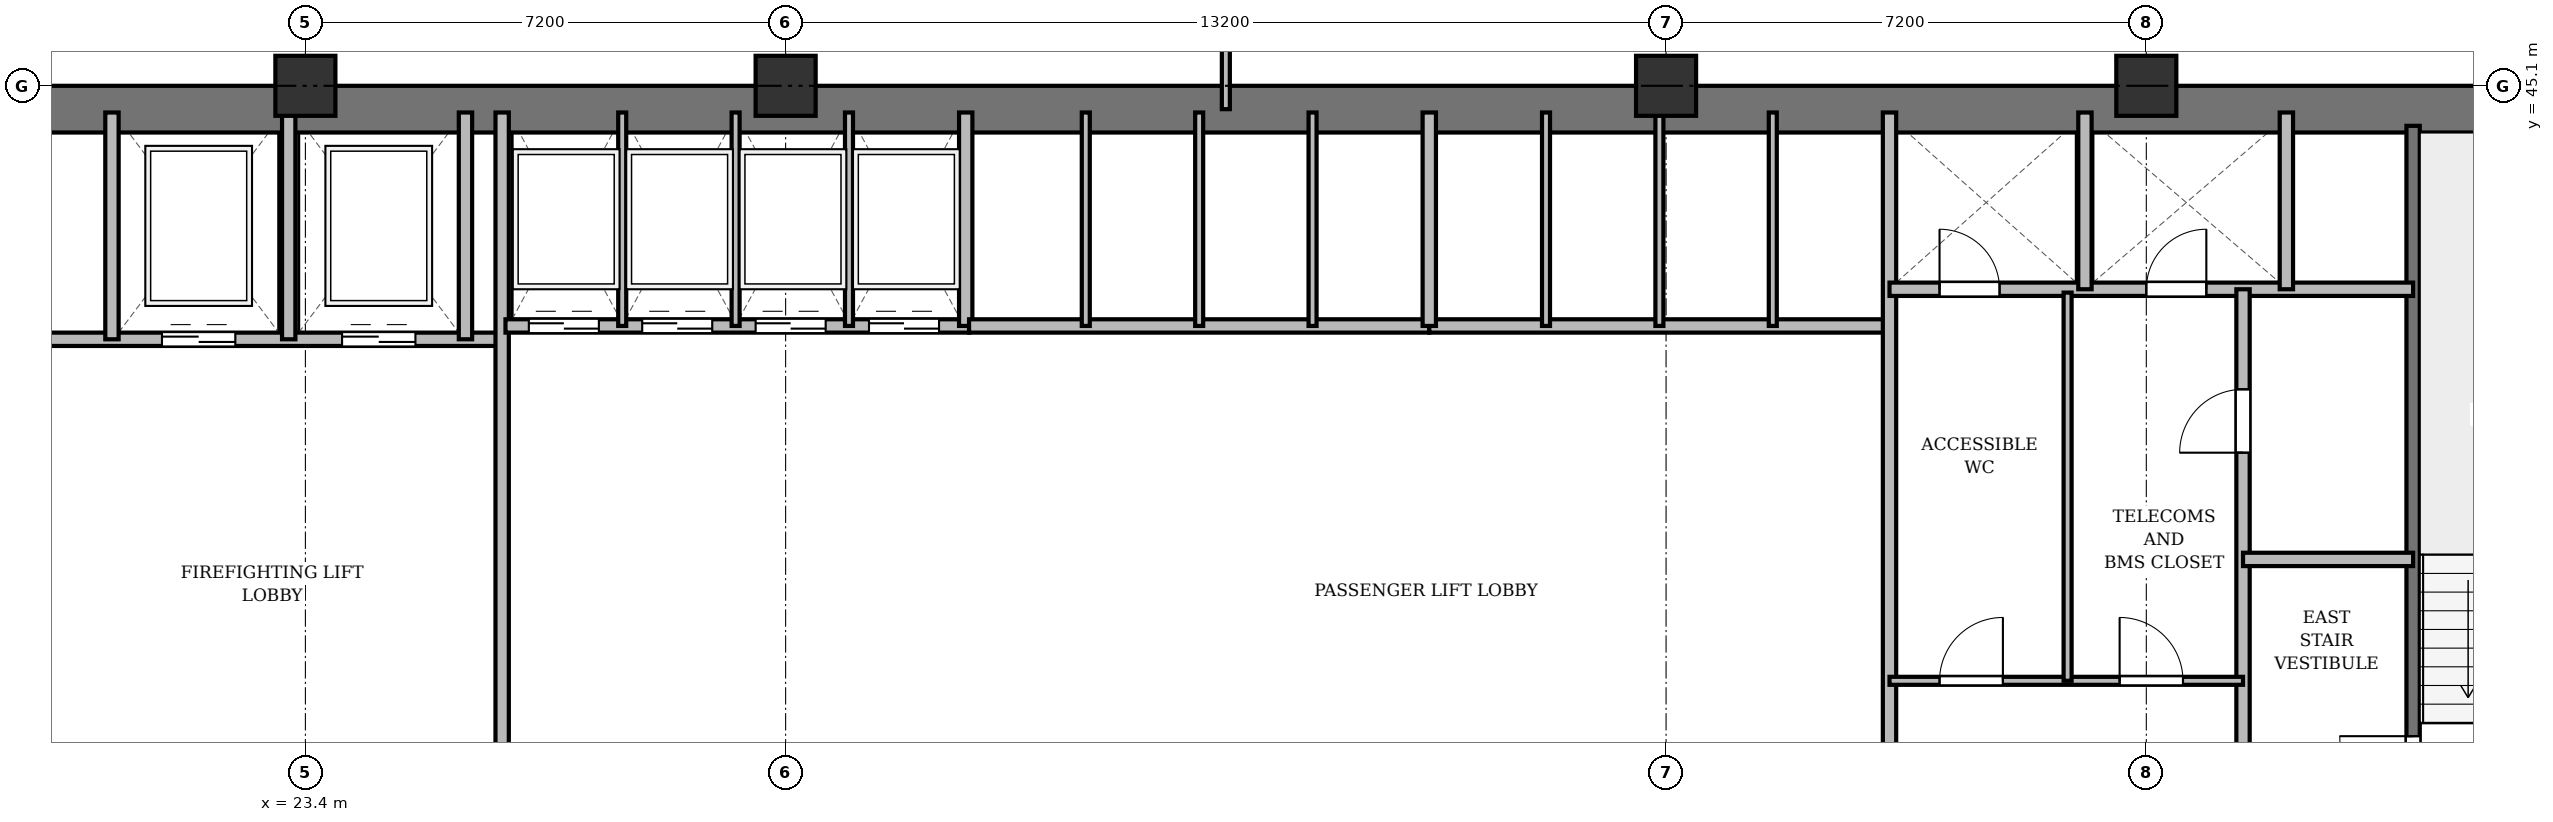
"""IFC4 building model, lengths in metres.
Left out: names, types, materials, properties, quantities, classifications, styles, units other than length and angle.
Written with IfcOpenShell. Run it as: python <this file> out.ifc"""

import sys

from ifc_helpers import new_model, si_unit, direction, frame, frame_2d, origin, origin_2d, place, context, subcontext, project, spatial, rectangle, extrude, source, transform, mapped, element, fill, save


model = new_model("IFC4")
c1 = context("Model", 3, precision=1e-05, world=origin(), true_north=direction((0.0, 1.0)))
c2 = subcontext(c1, "Body", "Model", "MODEL_VIEW")
j1 = project(units=[si_unit("LENGTHUNIT", "METRE"), si_unit("PLANEANGLEUNIT", "RADIAN")], contexts=[c1])
p1 = place(None, origin())
s1 = spatial("IfcSite", under=j1, at=p1, CompositionType="ELEMENT")
p2 = place(p1, origin())
s2 = spatial("IfcBuilding", under=s1, at=p2, CompositionType="ELEMENT")
p3 = place(p2, frame((0.0, 0.0, 45.1)))
s3 = spatial("IfcBuildingStorey", under=s2, at=p3, CompositionType="ELEMENT", Elevation=45.1)
m1 = source(origin(), c2, "Body", "SweptSolid", [
    extrude(rectangle(XDim=0.9, YDim=0.9, at=origin_2d()), origin(), (0.0, 0.0, 1.0), 3.6),
])
for number, where, z_axis, x_axis in (
    (1, (23.4, 45.1, 0.0), (0.0, 0.0, 1.0), (1.0, 0.0, 0.0)),
    (2, (30.6, 45.1, 0.0), (0.0, 0.0, 1.0), (1.0, 0.0, 0.0)),
    (3, (43.8, 45.1, 0.0), (0.0, 0.0, 1.0), (1.0, 0.0, 0.0)),
    (4, (51.0, 45.1, 0.0), (0.0, 0.0, 1.0), (1.0, 0.0, 0.0)),
):
    element("IfcColumn", number, at=place(p3, frame(where, z_axis=z_axis, x_axis=x_axis)), inside=s3, PredefinedType="COLUMN", context=c2, shape_type="MappedRepresentation", body=[
        mapped(m1, transform((0.0, 0.0, 0.0), x_axis=(1.0, 0.0, 0.0), y_axis=(0.0, 1.0, 0.0), z_axis=(0.0, 0.0, 1.0), scale=1.0)),
    ])
p4 = place(p3, frame((15.5, 44.75, 0.0), z_axis=(0.0, 0.0, 1.0), x_axis=(1.0, 0.0, 0.0)))
e5 = element("IfcWall", 5, at=p4, inside=s3, PredefinedType="SHEAR", context=c2, shape_type="SweptSolid", body=[
    extrude(rectangle(XDim=43.4, YDim=0.7, at=frame_2d((21.7, 0.0))), origin(), (0.0, 0.0, 1.0), 3.34),
])
p5 = place(p3, frame((55.0, 33.4, 0.0), z_axis=(0.0, 0.0, 1.0), x_axis=(0.0, 1.0, 0.0)))
e6 = element("IfcWall", 6, at=p5, inside=s3, PredefinedType="SHEAR", context=c2, shape_type="SweptSolid", body=[
    extrude(rectangle(XDim=11.1, YDim=0.2, at=frame_2d((5.55, 0.0))), origin(), (0.0, 0.0, 1.0), 3.34),
])
p6 = place(p5, frame((0.85, 0.0, 0.0)))
e7 = element("IfcOpeningElement", 7, at=p6, cuts=e6, PredefinedType="OPENING", context=c2, shape_type="SweptSolid", body=[
    extrude(rectangle(XDim=1.1, YDim=2.15, at=frame_2d((0.55, 1.075))), frame((0.0, 0.11, 0.0), z_axis=(0.0, -1.0, 0.0), x_axis=(1.0, 0.0, 0.0)), (0.0, 0.0, 1.0), 0.22),
])
p7 = place(p3, frame((19.55, 41.3, 0.0), z_axis=(0.0, 0.0, 1.0), x_axis=(1.0, 0.0, 0.0)))
e8 = element("IfcWall", 8, at=p7, inside=s3, PredefinedType="SOLIDWALL", context=c2, shape_type="SweptSolid", body=[
    extrude(rectangle(XDim=6.75, YDim=0.2, at=frame_2d((3.375, 0.0))), origin(), (0.0, 0.0, 1.0), 3.34),
])
p8 = place(p7, frame((1.7, 0.0, 0.0)))
e9 = element("IfcOpeningElement", 9, at=p8, cuts=e8, PredefinedType="OPENING", context=c2, shape_type="SweptSolid", body=[
    extrude(rectangle(XDim=1.1, YDim=2.15, at=frame_2d((0.55, 1.075))), frame((0.0, 0.11, 0.0), z_axis=(0.0, -1.0, 0.0), x_axis=(1.0, 0.0, 0.0)), (0.0, 0.0, 1.0), 0.22),
])
p9 = place(p7, frame((4.4, 0.0, 0.0)))
e10 = element("IfcOpeningElement", 10, at=p9, cuts=e8, PredefinedType="OPENING", context=c2, shape_type="SweptSolid", body=[
    extrude(rectangle(XDim=1.1, YDim=2.15, at=frame_2d((0.55, 1.075))), frame((0.0, 0.11, 0.0), z_axis=(0.0, -1.0, 0.0), x_axis=(1.0, 0.0, 0.0)), (0.0, 0.0, 1.0), 0.22),
])
for number, where, z_axis, x_axis in (
    (11, (20.5, 41.3, 0.0), (0.0, 0.0, 1.0), (0.0, 1.0, 0.0)),
    (12, (23.15, 41.3, 0.0), (0.0, 0.0, 1.0), (0.0, 1.0, 0.0)),
    (13, (25.8, 41.3, 0.0), (0.0, 0.0, 1.0), (0.0, 1.0, 0.0)),
):
    element("IfcWall", number, at=place(p3, frame(where, z_axis=z_axis, x_axis=x_axis)), inside=s3, PredefinedType="SOLIDWALL", context=c2, shape_type="SweptSolid", body=[
        extrude(rectangle(XDim=3.4, YDim=0.2, at=frame_2d((1.7, 0.0))), origin(), (0.0, 0.0, 1.0), 3.34),
    ])
p10 = place(p3, frame((26.35, 33.4, 0.0), z_axis=(0.0, 0.0, 1.0), x_axis=(0.0, 1.0, 0.0)))
e14 = element("IfcWall", 14, at=p10, inside=s3, PredefinedType="SOLIDWALL", context=c2, shape_type="SweptSolid", body=[
    extrude(rectangle(XDim=11.3, YDim=0.2, at=frame_2d((5.65, 0.0))), origin(), (0.0, 0.0, 1.0), 2.69),
])
p11 = place(p3, frame((26.4, 41.5, 0.0), z_axis=(0.0, 0.0, 1.0), x_axis=(1.0, 0.0, 0.0)))
e15 = element("IfcWall", 15, at=p11, inside=s3, PredefinedType="SOLIDWALL", context=c2, shape_type="SweptSolid", body=[
    extrude(rectangle(XDim=6.95, YDim=0.2, at=frame_2d((3.475, 0.0))), origin(), (0.0, 0.0, 1.0), 3.34),
])
p12 = place(p11, frame((0.35, 0.0, 0.0)))
e16 = element("IfcOpeningElement", 16, at=p12, cuts=e15, PredefinedType="OPENING", context=c2, shape_type="SweptSolid", body=[
    extrude(rectangle(XDim=1.05, YDim=2.15, at=frame_2d((0.525, 1.075))), frame((0.0, 0.11, 0.0), z_axis=(0.0, -1.0, 0.0), x_axis=(1.0, 0.0, 0.0)), (0.0, 0.0, 1.0), 0.22),
])
p13 = place(p11, frame((2.05, 0.0, 0.0)))
e17 = element("IfcOpeningElement", 17, at=p13, cuts=e15, PredefinedType="OPENING", context=c2, shape_type="SweptSolid", body=[
    extrude(rectangle(XDim=1.05, YDim=2.15, at=frame_2d((0.525, 1.075))), frame((0.0, 0.11, 0.0), z_axis=(0.0, -1.0, 0.0), x_axis=(1.0, 0.0, 0.0)), (0.0, 0.0, 1.0), 0.22),
])
p14 = place(p11, frame((3.75, 0.0, 0.0)))
e18 = element("IfcOpeningElement", 18, at=p14, cuts=e15, PredefinedType="OPENING", context=c2, shape_type="SweptSolid", body=[
    extrude(rectangle(XDim=1.05, YDim=2.15, at=frame_2d((0.525, 1.075))), frame((0.0, 0.11, 0.0), z_axis=(0.0, -1.0, 0.0), x_axis=(1.0, 0.0, 0.0)), (0.0, 0.0, 1.0), 0.22),
])
p15 = place(p11, frame((5.45, 0.0, 0.0)))
e19 = element("IfcOpeningElement", 19, at=p15, cuts=e15, PredefinedType="OPENING", context=c2, shape_type="SweptSolid", body=[
    extrude(rectangle(XDim=1.05, YDim=2.15, at=frame_2d((0.525, 1.075))), frame((0.0, 0.11, 0.0), z_axis=(0.0, -1.0, 0.0), x_axis=(1.0, 0.0, 0.0)), (0.0, 0.0, 1.0), 0.22),
])
p16 = place(p3, frame((33.3, 41.5, 0.0), z_axis=(0.0, 0.0, 1.0), x_axis=(0.0, 1.0, 0.0)))
e20 = element("IfcWall", 20, at=p16, inside=s3, PredefinedType="SOLIDWALL", context=c2, shape_type="SweptSolid", body=[
    extrude(rectangle(XDim=3.2, YDim=0.2, at=frame_2d((1.6, 0.0))), origin(), (0.0, 0.0, 1.0), 3.34),
])
for number, where, z_axis, x_axis in (
    (21, (28.15, 41.5, 0.0), (0.0, 0.0, 1.0), (0.0, 1.0, 0.0)),
    (22, (29.85, 41.5, 0.0), (0.0, 0.0, 1.0), (0.0, 1.0, 0.0)),
    (23, (31.55, 41.5, 0.0), (0.0, 0.0, 1.0), (0.0, 1.0, 0.0)),
):
    element("IfcWall", number, at=place(p3, frame(where, z_axis=z_axis, x_axis=x_axis)), inside=s3, PredefinedType="PARTITIONING", context=c2, shape_type="SweptSolid", body=[
        extrude(rectangle(XDim=3.2, YDim=0.12, at=frame_2d((1.6, 0.0))), origin(), (0.0, 0.0, 1.0), 3.34),
    ])
p17 = place(p3, frame((33.35, 41.5, 0.0), z_axis=(0.0, 0.0, 1.0), x_axis=(1.0, 0.0, 0.0)))
e24 = element("IfcWall", 24, at=p17, inside=s3, PredefinedType="SOLIDWALL", context=c2, shape_type="SweptSolid", body=[
    extrude(rectangle(XDim=6.9, YDim=0.2, at=frame_2d((3.45, 0.0))), origin(), (0.0, 0.0, 1.0), 3.34),
])
for number, where, z_axis, x_axis in (
    (25, (35.1, 41.5, 0.0), (0.0, 0.0, 1.0), (0.0, 1.0, 0.0)),
    (26, (36.8, 41.5, 0.0), (0.0, 0.0, 1.0), (0.0, 1.0, 0.0)),
    (27, (38.5, 41.5, 0.0), (0.0, 0.0, 1.0), (0.0, 1.0, 0.0)),
):
    element("IfcWall", number, at=place(p3, frame(where, z_axis=z_axis, x_axis=x_axis)), inside=s3, PredefinedType="PARTITIONING", context=c2, shape_type="SweptSolid", body=[
        extrude(rectangle(XDim=3.2, YDim=0.12, at=frame_2d((1.6, 0.0))), origin(), (0.0, 0.0, 1.0), 3.34),
    ])
p18 = place(p3, frame((40.25, 41.5, 0.0), z_axis=(0.0, 0.0, 1.0), x_axis=(1.0, 0.0, 0.0)))
e28 = element("IfcWall", 28, at=p18, inside=s3, PredefinedType="SOLIDWALL", context=c2, shape_type="SweptSolid", body=[
    extrude(rectangle(XDim=6.9, YDim=0.2, at=frame_2d((3.45, 0.0))), origin(), (0.0, 0.0, 1.0), 2.752),
])
p19 = place(p3, frame((40.25, 41.5, 0.0), z_axis=(0.0, 0.0, 1.0), x_axis=(0.0, 1.0, 0.0)))
e29 = element("IfcWall", 29, at=p19, inside=s3, PredefinedType="SOLIDWALL", context=c2, shape_type="SweptSolid", body=[
    extrude(rectangle(XDim=3.2, YDim=0.2, at=frame_2d((1.6, 0.0))), origin(), (0.0, 0.0, 1.0), 3.34),
])
p20 = place(p3, frame((42.0, 41.5, 0.0), z_axis=(0.0, 0.0, 1.0), x_axis=(0.0, 1.0, 0.0)))
e30 = element("IfcWall", 30, at=p20, inside=s3, PredefinedType="PARTITIONING", context=c2, shape_type="SweptSolid", body=[
    extrude(rectangle(XDim=3.2, YDim=0.12, at=frame_2d((1.6, 0.0))), origin(), (0.0, 0.0, 1.0), 3.34),
])
p21 = place(p3, frame((43.7, 41.5, 0.0), z_axis=(0.0, 0.0, 1.0), x_axis=(0.0, 1.0, 0.0)))
e31 = element("IfcWall", 31, at=p21, inside=s3, PredefinedType="PARTITIONING", context=c2, shape_type="SweptSolid", body=[
    extrude(rectangle(XDim=3.2, YDim=0.12, at=frame_2d((1.6, 0.0))), origin(), (0.0, 0.0, 1.0), 2.752),
])
p22 = place(p3, frame((45.4, 41.5, 0.0), z_axis=(0.0, 0.0, 1.0), x_axis=(0.0, 1.0, 0.0)))
e32 = element("IfcWall", 32, at=p22, inside=s3, PredefinedType="PARTITIONING", context=c2, shape_type="SweptSolid", body=[
    extrude(rectangle(XDim=3.2, YDim=0.12, at=frame_2d((1.6, 0.0))), origin(), (0.0, 0.0, 1.0), 3.34),
])
p23 = place(p3, frame((47.15, 33.4, 0.0), z_axis=(0.0, 0.0, 1.0), x_axis=(0.0, 1.0, 0.0)))
e33 = element("IfcWall", 33, at=p23, inside=s3, PredefinedType="SOLIDWALL", context=c2, shape_type="SweptSolid", body=[
    extrude(rectangle(XDim=11.3, YDim=0.2, at=frame_2d((5.65, 0.0))), origin(), (0.0, 0.0, 1.0), 2.69),
])
p24 = place(p3, frame((47.15, 42.05, 0.0), z_axis=(0.0, 0.0, 1.0), x_axis=(1.0, 0.0, 0.0)))
e34 = element("IfcWall", 34, at=p24, inside=s3, PredefinedType="SOLIDWALL", context=c2, shape_type="SweptSolid", body=[
    extrude(rectangle(XDim=7.85, YDim=0.2, at=frame_2d((3.925, 0.0))), origin(), (0.0, 0.0, 1.0), 2.752),
])
p25 = place(p24, frame((0.75, 0.0, 0.0)))
e35 = element("IfcOpeningElement", 35, at=p25, cuts=e34, PredefinedType="OPENING", context=c2, shape_type="SweptSolid", body=[
    extrude(rectangle(XDim=0.9, YDim=2.1, at=frame_2d((0.45, 1.05))), frame((0.0, 0.11, 0.0), z_axis=(0.0, -1.0, 0.0), x_axis=(1.0, 0.0, 0.0)), (0.0, 0.0, 1.0), 0.22),
])
p26 = place(p24, frame((3.85, 0.0, 0.0)))
e36 = element("IfcOpeningElement", 36, at=p26, cuts=e34, PredefinedType="OPENING", context=c2, shape_type="SweptSolid", body=[
    extrude(rectangle(XDim=0.9, YDim=2.1, at=frame_2d((0.45, 1.05))), frame((0.0, 0.11, 0.0), z_axis=(0.0, -1.0, 0.0), x_axis=(1.0, 0.0, 0.0)), (0.0, 0.0, 1.0), 0.22),
])
for number, where, z_axis, x_axis in (
    (37, (50.08, 42.05, 0.0), (0.0, 0.0, 1.0), (0.0, 1.0, 0.0)),
    (38, (53.1, 42.05, 0.0), (0.0, 0.0, 1.0), (0.0, 1.0, 0.0)),
):
    element("IfcWall", number, at=place(p3, frame(where, z_axis=z_axis, x_axis=x_axis)), inside=s3, PredefinedType="SOLIDWALL", context=c2, shape_type="SweptSolid", body=[
        extrude(rectangle(XDim=2.65, YDim=0.2, at=frame_2d((1.325, 0.0))), origin(), (0.0, 0.0, 1.0), 3.34),
    ])
p27 = place(p3, frame((52.45, 33.4, 0.0), z_axis=(0.0, 0.0, 1.0), x_axis=(0.0, 1.0, 0.0)))
e39 = element("IfcWall", 39, at=p27, inside=s3, PredefinedType="PARTITIONING", context=c2, shape_type="SweptSolid", body=[
    extrude(rectangle(XDim=8.65, YDim=0.2, at=frame_2d((4.325, 0.0))), origin(), (0.0, 0.0, 1.0), 2.69),
])
p28 = place(p27, frame((6.2, 0.0, 0.0)))
e40 = element("IfcOpeningElement", 40, at=p28, cuts=e39, PredefinedType="OPENING", context=c2, shape_type="SweptSolid", body=[
    extrude(rectangle(XDim=0.95, YDim=2.15, at=frame_2d((0.475, 1.075))), frame((0.0, 0.11, 0.0), z_axis=(0.0, -1.0, 0.0), x_axis=(1.0, 0.0, 0.0)), (0.0, 0.0, 1.0), 0.22),
])
p29 = place(p3, frame((52.45, 38.0, 0.0), z_axis=(0.0, 0.0, 1.0), x_axis=(1.0, 0.0, 0.0)))
e41 = element("IfcWall", 41, at=p29, inside=s3, PredefinedType="PARTITIONING", context=c2, shape_type="SweptSolid", body=[
    extrude(rectangle(XDim=2.55, YDim=0.2, at=frame_2d((1.275, 0.0))), origin(), (0.0, 0.0, 1.0), 3.34),
])
p30 = place(p3, frame((47.15, 36.18, 0.0), z_axis=(0.0, 0.0, 1.0), x_axis=(1.0, 0.0, 0.0)))
e42 = element("IfcWall", 42, at=p30, inside=s3, PredefinedType="PARTITIONING", context=c2, shape_type="SweptSolid", body=[
    extrude(rectangle(XDim=5.3, YDim=0.12, at=frame_2d((2.65, 0.0))), origin(), (0.0, 0.0, 1.0), 2.752),
])
p31 = place(p30, frame((0.75, 0.0, 0.0)))
e43 = element("IfcOpeningElement", 43, at=p31, cuts=e42, PredefinedType="OPENING", context=c2, shape_type="SweptSolid", body=[
    extrude(rectangle(XDim=0.95, YDim=2.15, at=frame_2d((0.475, 1.075))), frame((0.0, 0.07, 0.0), z_axis=(0.0, -1.0, 0.0), x_axis=(1.0, 0.0, 0.0)), (0.0, 0.0, 1.0), 0.14),
])
p32 = place(p30, frame((3.45, 0.0, 0.0)))
e44 = element("IfcOpeningElement", 44, at=p32, cuts=e42, PredefinedType="OPENING", context=c2, shape_type="SweptSolid", body=[
    extrude(rectangle(XDim=0.95, YDim=2.15, at=frame_2d((0.475, 1.075))), frame((0.0, 0.07, 0.0), z_axis=(0.0, -1.0, 0.0), x_axis=(1.0, 0.0, 0.0)), (0.0, 0.0, 1.0), 0.14),
])
p33 = place(p3, frame((49.82, 36.18, 0.0), z_axis=(0.0, 0.0, 1.0), x_axis=(0.0, 1.0, 0.0)))
e45 = element("IfcWall", 45, at=p33, inside=s3, PredefinedType="PARTITIONING", context=c2, shape_type="SweptSolid", body=[
    extrude(rectangle(XDim=5.82, YDim=0.12, at=frame_2d((2.91, 0.0))), origin(), (0.0, 0.0, 1.0), 3.34),
])
p34 = place(p3, frame((37.2, 44.75, 0.0), z_axis=(0.0, 0.0, 1.0), x_axis=(0.0, 1.0, 0.0)))
e46 = element("IfcWall", 46, at=p34, inside=s3, PredefinedType="PARTITIONING", context=c2, shape_type="SweptSolid", body=[
    extrude(rectangle(XDim=3.61, YDim=0.12, at=frame_2d((1.805, 0.0))), origin(), (0.0, 0.0, 1.0), 2.69),
])
p35 = place(p34, frame((1.1, 0.0, 0.0)))
e47 = element("IfcOpeningElement", 47, at=p35, cuts=e46, PredefinedType="OPENING", context=c2, shape_type="SweptSolid", body=[
    extrude(rectangle(XDim=0.95, YDim=2.15, at=frame_2d((0.475, 1.075))), frame((0.0, 0.07, 0.0), z_axis=(0.0, -1.0, 0.0), x_axis=(1.0, 0.0, 0.0)), (0.0, 0.0, 1.0), 0.14),
])
m2 = source(origin(), c2, "Body", "SweptSolid", [
    extrude(rectangle(XDim=1.1, YDim=2.15, at=frame_2d((0.55, 1.075))), frame((0.0, 0.025, 0.0), z_axis=(0.0, -1.0, 0.0), x_axis=(1.0, 0.0, 0.0)), (0.0, 0.0, 1.0), 0.05),
])
p36 = place(p6, origin())
e48 = element("IfcDoor", 48, at=p36, inside=s3, OperationType="SINGLE_SWING_RIGHT", PredefinedType="DOOR", context=c2, shape_type="MappedRepresentation", body=[
    mapped(m2, transform((0.0, 0.0, 0.0), x_axis=(1.0, 0.0, 0.0), y_axis=(0.0, 1.0, 0.0), z_axis=(0.0, 0.0, 1.0), scale=1.0)),
])
fill(e7, e48)
p37 = place(p8, origin())
e49 = element("IfcDoor", 49, at=p37, inside=s3, OperationType="DOUBLE_DOOR_SLIDING", PredefinedType="DOOR", context=c2, shape_type="MappedRepresentation", body=[
    mapped(m2, transform((0.0, 0.0, 0.0), x_axis=(1.0, 0.0, 0.0), y_axis=(0.0, 1.0, 0.0), z_axis=(0.0, 0.0, 1.0), scale=1.0)),
])
fill(e9, e49)
p38 = place(p9, origin())
e50 = element("IfcDoor", 50, at=p38, inside=s3, OperationType="DOUBLE_DOOR_SLIDING", PredefinedType="DOOR", context=c2, shape_type="MappedRepresentation", body=[
    mapped(m2, transform((0.0, 0.0, 0.0), x_axis=(1.0, 0.0, 0.0), y_axis=(0.0, 1.0, 0.0), z_axis=(0.0, 0.0, 1.0), scale=1.0)),
])
fill(e10, e50)
m3 = source(origin(), c2, "Body", "SweptSolid", [
    extrude(rectangle(XDim=1.05, YDim=2.15, at=frame_2d((0.525, 1.075))), frame((0.0, 0.025, 0.0), z_axis=(0.0, -1.0, 0.0), x_axis=(1.0, 0.0, 0.0)), (0.0, 0.0, 1.0), 0.05),
])
p39 = place(p12, origin())
e51 = element("IfcDoor", 51, at=p39, inside=s3, OperationType="DOUBLE_DOOR_SLIDING", PredefinedType="DOOR", context=c2, shape_type="MappedRepresentation", body=[
    mapped(m3, transform((0.0, 0.0, 0.0), x_axis=(1.0, 0.0, 0.0), y_axis=(0.0, 1.0, 0.0), z_axis=(0.0, 0.0, 1.0), scale=1.0)),
])
fill(e16, e51)
p40 = place(p13, origin())
e52 = element("IfcDoor", 52, at=p40, inside=s3, OperationType="DOUBLE_DOOR_SLIDING", PredefinedType="DOOR", context=c2, shape_type="MappedRepresentation", body=[
    mapped(m3, transform((0.0, 0.0, 0.0), x_axis=(1.0, 0.0, 0.0), y_axis=(0.0, 1.0, 0.0), z_axis=(0.0, 0.0, 1.0), scale=1.0)),
])
fill(e17, e52)
p41 = place(p14, origin())
e53 = element("IfcDoor", 53, at=p41, inside=s3, OperationType="DOUBLE_DOOR_SLIDING", PredefinedType="DOOR", context=c2, shape_type="MappedRepresentation", body=[
    mapped(m3, transform((0.0, 0.0, 0.0), x_axis=(1.0, 0.0, 0.0), y_axis=(0.0, 1.0, 0.0), z_axis=(0.0, 0.0, 1.0), scale=1.0)),
])
fill(e18, e53)
p42 = place(p15, origin())
e54 = element("IfcDoor", 54, at=p42, inside=s3, OperationType="DOUBLE_DOOR_SLIDING", PredefinedType="DOOR", context=c2, shape_type="MappedRepresentation", body=[
    mapped(m3, transform((0.0, 0.0, 0.0), x_axis=(1.0, 0.0, 0.0), y_axis=(0.0, 1.0, 0.0), z_axis=(0.0, 0.0, 1.0), scale=1.0)),
])
fill(e19, e54)
m4 = source(origin(), c2, "Body", "SweptSolid", [
    extrude(rectangle(XDim=0.9, YDim=2.1, at=frame_2d((0.45, 1.05))), frame((0.0, 0.025, 0.0), z_axis=(0.0, -1.0, 0.0), x_axis=(1.0, 0.0, 0.0)), (0.0, 0.0, 1.0), 0.05),
])
p43 = place(p25, origin())
e55 = element("IfcDoor", 55, at=p43, inside=s3, OperationType="SINGLE_SWING_LEFT", PredefinedType="DOOR", context=c2, shape_type="MappedRepresentation", body=[
    mapped(m4, transform((0.0, 0.0, 0.0), x_axis=(1.0, 0.0, 0.0), y_axis=(0.0, 1.0, 0.0), z_axis=(0.0, 0.0, 1.0), scale=1.0)),
])
fill(e35, e55)
p44 = place(p26, origin())
e56 = element("IfcDoor", 56, at=p44, inside=s3, OperationType="SINGLE_SWING_RIGHT", PredefinedType="DOOR", context=c2, shape_type="MappedRepresentation", body=[
    mapped(m4, transform((0.0, 0.0, 0.0), x_axis=(1.0, 0.0, 0.0), y_axis=(0.0, 1.0, 0.0), z_axis=(0.0, 0.0, 1.0), scale=1.0)),
])
fill(e36, e56)
m5 = source(origin(), c2, "Body", "SweptSolid", [
    extrude(rectangle(XDim=0.95, YDim=2.15, at=frame_2d((0.475, 1.075))), frame((0.0, 0.025, 0.0), z_axis=(0.0, -1.0, 0.0), x_axis=(1.0, 0.0, 0.0)), (0.0, 0.0, 1.0), 0.05),
])
p45 = place(p28, origin())
e57 = element("IfcDoor", 57, at=p45, inside=s3, OperationType="SINGLE_SWING_LEFT", PredefinedType="DOOR", context=c2, shape_type="MappedRepresentation", body=[
    mapped(m5, transform((0.0, 0.0, 0.0), x_axis=(1.0, 0.0, 0.0), y_axis=(0.0, 1.0, 0.0), z_axis=(0.0, 0.0, 1.0), scale=1.0)),
])
fill(e40, e57)
p46 = place(p31, origin())
e58 = element("IfcDoor", 58, at=p46, inside=s3, OperationType="SINGLE_SWING_RIGHT", PredefinedType="DOOR", context=c2, shape_type="MappedRepresentation", body=[
    mapped(m5, transform((0.0, 0.0, 0.0), x_axis=(1.0, 0.0, 0.0), y_axis=(0.0, 1.0, 0.0), z_axis=(0.0, 0.0, 1.0), scale=1.0)),
])
fill(e43, e58)
p47 = place(p32, origin())
e59 = element("IfcDoor", 59, at=p47, inside=s3, OperationType="SINGLE_SWING_LEFT", PredefinedType="DOOR", context=c2, shape_type="MappedRepresentation", body=[
    mapped(m5, transform((0.0, 0.0, 0.0), x_axis=(1.0, 0.0, 0.0), y_axis=(0.0, 1.0, 0.0), z_axis=(0.0, 0.0, 1.0), scale=1.0)),
])
fill(e44, e59)
save(model, sys.argv[1])
